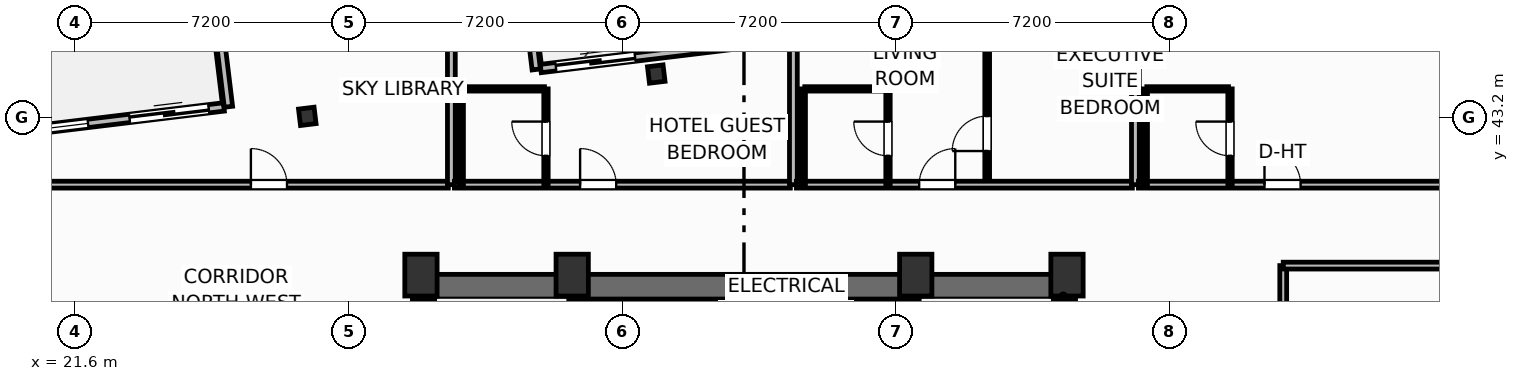
"""IFC4 building model, lengths in metres.
Left out: names, types, materials, properties, quantities, classifications, styles, units other than length and angle.
Written with IfcOpenShell. Run it as: python <this file> out.ifc"""

import sys

from ifc_helpers import new_model, si_unit, direction, frame, frame_2d, origin, origin_2d, place, context, subcontext, project, spatial, rectangle, i_section, extrude, element, fill, save


model = new_model("IFC4")
c1 = context("Model", 3, precision=1e-05, world=origin(), true_north=direction((0.0, 1.0)))
c2 = subcontext(c1, "Body", "Model", "MODEL_VIEW")
j1 = project(units=[si_unit("LENGTHUNIT", "METRE"), si_unit("PLANEANGLEUNIT", "RADIAN")], contexts=[c1])
p1 = place(None, origin())
s1 = spatial("IfcSite", under=j1, at=p1, CompositionType="ELEMENT")
p2 = place(p1, origin())
s2 = spatial("IfcBuilding", under=s1, at=p2, CompositionType="ELEMENT")
p3 = place(p2, frame((0.0, 0.0, 178.3)))
s3 = spatial("IfcBuildingStorey", under=s2, at=p3, CompositionType="ELEMENT", Elevation=178.3)
for number, where, z_axis, x_axis in (
    (1, (30.7, 39.05, 0.0), (0.0, 0.0, 1.0), (1.0, 0.0, 0.0)),
    (2, (34.68, 39.05, 0.0), (0.0, 0.0, 1.0), (1.0, 0.0, 0.0)),
    (3, (43.72, 39.05, 0.0), (0.0, 0.0, 1.0), (1.0, 0.0, 0.0)),
    (4, (47.7, 39.05, 0.0), (0.0, 0.0, 1.0), (1.0, 0.0, 0.0)),
):
    element("IfcColumn", number, at=place(p3, frame(where, z_axis=z_axis, x_axis=x_axis)), inside=s3, PredefinedType="COLUMN", context=c2, shape_type="SweptSolid", body=[
        extrude(rectangle(XDim=0.85, YDim=1.1, at=origin_2d()), origin(), (0.0, 0.0, 1.0), 3.7),
    ])
p4 = place(p3, frame((30.48, 38.745, 0.0), z_axis=(0.0, 0.0, 1.0), x_axis=(1.0, 0.0, 0.0)))
e5 = element("IfcWall", 5, at=p4, inside=s3, PredefinedType="SHEAR", context=c2, shape_type="SweptSolid", body=[
    extrude(rectangle(XDim=17.44, YDim=0.65, at=frame_2d((8.72, 0.0))), origin(), (0.0, 0.0, 1.0), 3.45),
])
for number, where, z_axis, x_axis in (
    (6, (30.805, 29.2, 0.0), (0.0, 0.0, 1.0), (0.0, 1.0, 0.0)),
    (7, (47.595, 29.2, 0.0), (0.0, 0.0, 1.0), (0.0, 1.0, 0.0)),
):
    element("IfcWall", number, at=place(p3, frame(where, z_axis=z_axis, x_axis=x_axis)), inside=s3, PredefinedType="SHEAR", context=c2, shape_type="SweptSolid", body=[
        extrude(rectangle(XDim=9.22, YDim=0.65, at=frame_2d((4.61, 0.0))), origin(), (0.0, 0.0, 1.0), 3.45),
    ])
p5 = place(p3, frame((34.64, 29.2, 0.0), z_axis=(0.0, 0.0, 1.0), x_axis=(0.0, 1.0, 0.0)))
e8 = element("IfcWall", 8, at=p5, inside=s3, PredefinedType="SHEAR", context=c2, shape_type="SweptSolid", body=[
    extrude(rectangle(XDim=9.22, YDim=0.25, at=frame_2d((4.61, 0.0))), origin(), (0.0, 0.0, 1.0), 3.45),
])
p6 = place(p5, frame((0.65, 0.0, 0.0)))
e9 = element("IfcOpeningElement", 9, at=p6, cuts=e8, PredefinedType="OPENING", context=c2, shape_type="SweptSolid", body=[
    extrude(rectangle(XDim=1.05, YDim=2.15, at=frame_2d((0.525, 1.075))), frame((0.0, 0.135, 0.0), z_axis=(0.0, -1.0, 0.0), x_axis=(1.0, 0.0, 0.0)), (0.0, 0.0, 1.0), 0.27),
])
p7 = place(p3, frame((43.76, 29.2, 0.0), z_axis=(0.0, 0.0, 1.0), x_axis=(0.0, 1.0, 0.0)))
e10 = element("IfcWall", 10, at=p7, inside=s3, PredefinedType="SHEAR", context=c2, shape_type="SweptSolid", body=[
    extrude(rectangle(XDim=9.22, YDim=0.25, at=frame_2d((4.61, 0.0))), origin(), (0.0, 0.0, 1.0), 3.45),
])
p8 = place(p7, frame((0.65, 0.0, 0.0)))
e11 = element("IfcOpeningElement", 11, at=p8, cuts=e10, PredefinedType="OPENING", context=c2, shape_type="SweptSolid", body=[
    extrude(rectangle(XDim=1.05, YDim=2.15, at=frame_2d((0.525, 1.075))), frame((0.0, 0.135, 0.0), z_axis=(0.0, -1.0, 0.0), x_axis=(1.0, 0.0, 0.0)), (0.0, 0.0, 1.0), 0.27),
])
for number, where, z_axis, x_axis in (
    (12, (36.892, 44.341, 0.0), (0.0, 0.0, 1.0), (0.993, 0.12, 0.0)),
    (13, (27.709, 43.227, 0.0), (0.0, 0.0, 1.0), (0.993, 0.12, 0.0)),
):
    element("IfcColumn", number, at=place(p3, frame(where, z_axis=z_axis, x_axis=x_axis)), inside=s3, PredefinedType="COLUMN", context=c2, shape_type="SweptSolid", body=[
        extrude(i_section(OverallWidth=0.412, OverallDepth=0.435, WebThickness=0.036, FlangeThickness=0.057, FilletRadius=0.025, at=origin_2d()), origin(), (0.0, 0.0, 1.0), 3.7),
    ])
p9 = place(p3, frame((19.557, 42.753, 0.0), z_axis=(0.0, 0.0, 1.0), x_axis=(0.992729951822, 0.120362962556, 0.0)))
e14 = element("IfcWall", 14, at=p9, inside=s3, PredefinedType="SOLIDWALL", context=c2, shape_type="SweptSolid", body=[
    extrude(rectangle(XDim=6.0, YDim=0.22, at=frame_2d((3.0, 0.0))), origin(), (0.0, 0.0, 1.0), 2.73),
])
p10 = place(p9, frame((3.5, 0.0, 0.0)))
e15 = element("IfcOpeningElement", 15, at=p10, cuts=e14, PredefinedType="OPENING", context=c2, shape_type="SweptSolid", body=[
    extrude(rectangle(XDim=2.1, YDim=2.3, at=frame_2d((1.05, 1.15))), frame((0.0, 0.12, 0.0), z_axis=(0.0, -1.0, 0.0), x_axis=(1.0, 0.0, 0.0)), (0.0, 0.0, 1.0), 0.24),
])
p11 = place(p9, frame((0.55, 0.0, 0.75)))
e16 = element("IfcOpeningElement", 16, at=p11, cuts=e14, PredefinedType="OPENING", context=c2, shape_type="SweptSolid", body=[
    extrude(rectangle(XDim=1.85, YDim=1.75, at=frame_2d((0.925, 0.875))), frame((0.0, 0.12, 0.0), z_axis=(0.0, -1.0, 0.0), x_axis=(1.0, 0.0, 0.0)), (0.0, 0.0, 1.0), 0.24),
])
p12 = place(p3, frame((33.852, 44.486, 0.0), z_axis=(0.0, 0.0, 1.0), x_axis=(0.992729951822, 0.120362962556, 0.0)))
e17 = element("IfcWall", 17, at=p12, inside=s3, PredefinedType="SOLIDWALL", context=c2, shape_type="SweptSolid", body=[
    extrude(rectangle(XDim=6.0, YDim=0.22, at=frame_2d((3.0, 0.0))), origin(), (0.0, 0.0, 1.0), 2.73),
])
p13 = place(p12, frame((0.4, 0.0, 0.0)))
e18 = element("IfcOpeningElement", 18, at=p13, cuts=e17, PredefinedType="OPENING", context=c2, shape_type="SweptSolid", body=[
    extrude(rectangle(XDim=2.1, YDim=2.3, at=frame_2d((1.05, 1.15))), frame((0.0, 0.12, 0.0), z_axis=(0.0, -1.0, 0.0), x_axis=(1.0, 0.0, 0.0)), (0.0, 0.0, 1.0), 0.24),
])
p14 = place(p3, frame((33.734, 44.461, 0.0), z_axis=(0.0, 0.0, 1.0), x_axis=(-0.120327895535, 0.992734202874, 0.0)))
e19 = element("IfcWall", 19, at=p14, inside=s3, PredefinedType="SOLIDWALL", context=c2, shape_type="SweptSolid", body=[
    extrude(rectangle(XDim=2.1, YDim=0.22, at=frame_2d((1.05, 0.0))), origin(), (0.0, 0.0, 1.0), 2.73),
])
p15 = place(p3, frame((25.396, 45.44, 0.0), z_axis=(0.0, 0.0, 1.0), x_axis=(0.120275992932, -0.992740492538, 0.0)))
e20 = element("IfcWall", 20, at=p15, inside=s3, PredefinedType="SOLIDWALL", context=c2, shape_type="SweptSolid", body=[
    extrude(rectangle(XDim=1.975, YDim=0.22, at=frame_2d((0.988, 0.0))), origin(), (0.0, 0.0, 1.0), 2.73),
])
p16 = place(p3, frame((3.393, 41.43, 0.0), z_axis=(0.0, 0.0, 1.0), x_axis=(1.0, 0.0, 0.0)))
e21 = element("IfcWall", 21, at=p16, inside=s3, PredefinedType="PARTITIONING", context=c2, shape_type="SweptSolid", body=[
    extrude(rectangle(XDim=28.027, YDim=0.18, at=frame_2d((14.013, 0.0))), origin(), (0.0, 0.0, 1.0), 2.662),
])
p17 = place(p16, frame((22.832, 0.0, 0.0)))
e22 = element("IfcOpeningElement", 22, at=p17, cuts=e21, PredefinedType="OPENING", context=c2, shape_type="SweptSolid", body=[
    extrude(rectangle(XDim=0.95, YDim=2.05, at=frame_2d((0.475, 1.025))), frame((0.0, 0.1, 0.0), z_axis=(0.0, -1.0, 0.0), x_axis=(1.0, 0.0, 0.0)), (0.0, 0.0, 1.0), 0.2),
])
p18 = place(p3, frame((31.5, 41.43, 0.0), z_axis=(0.0, 0.0, 1.0), x_axis=(0.0, 1.0, 0.0)))
e23 = element("IfcWall", 23, at=p18, inside=s3, PredefinedType="PARTITIONING", context=c2, shape_type="SweptSolid", body=[
    extrude(rectangle(XDim=4.856, YDim=0.205, at=frame_2d((2.428, 0.0))), origin(), (0.0, 0.0, 1.0), 3.45),
])
p19 = place(p3, frame((31.58, 41.43, 0.0), z_axis=(0.0, 0.0, 1.0), x_axis=(1.0, 0.0, 0.0)))
e24 = element("IfcWall", 24, at=p19, inside=s3, PredefinedType="PARTITIONING", context=c2, shape_type="SweptSolid", body=[
    extrude(rectangle(XDim=8.84, YDim=0.18, at=frame_2d((4.42, 0.0))), origin(), (0.0, 0.0, 1.0), 3.45),
])
p20 = place(p19, frame((3.308, 0.0, 0.0)))
e25 = element("IfcOpeningElement", 25, at=p20, cuts=e24, PredefinedType="OPENING", context=c2, shape_type="SweptSolid", body=[
    extrude(rectangle(XDim=0.95, YDim=2.15, at=frame_2d((0.475, 1.075))), frame((0.0, 0.1, 0.0), z_axis=(0.0, -1.0, 0.0), x_axis=(1.0, 0.0, 0.0)), (0.0, 0.0, 1.0), 0.2),
])
p21 = place(p3, frame((31.8, 43.95, 0.0), z_axis=(0.0, 0.0, 1.0), x_axis=(1.0, 0.0, 0.0)))
e26 = element("IfcWall", 26, at=p21, inside=s3, PredefinedType="PARTITIONING", context=c2, shape_type="SweptSolid", body=[
    extrude(rectangle(XDim=2.15, YDim=0.115, at=frame_2d((1.075, 0.0))), origin(), (0.0, 0.0, 1.0), 2.824),
])
p22 = place(p3, frame((33.99, 41.43, 0.0), z_axis=(0.0, 0.0, 1.0), x_axis=(0.0, 1.0, 0.0)))
e27 = element("IfcWall", 27, at=p22, inside=s3, PredefinedType="PARTITIONING", context=c2, shape_type="SweptSolid", body=[
    extrude(rectangle(XDim=2.52, YDim=0.115, at=frame_2d((1.26, 0.0))), origin(), (0.0, 0.0, 1.0), 3.45),
])
p23 = place(p22, frame((0.76, 0.0, 0.0)))
e28 = element("IfcOpeningElement", 28, at=p23, cuts=e27, PredefinedType="OPENING", context=c2, shape_type="SweptSolid", body=[
    extrude(rectangle(XDim=0.9, YDim=2.05, at=frame_2d((0.45, 1.025))), frame((0.0, 0.067, 0.0), z_axis=(0.0, -1.0, 0.0), x_axis=(1.0, 0.0, 0.0)), (0.0, 0.0, 1.0), 0.135),
])
p24 = place(p3, frame((31.76, 41.43, 0.0), z_axis=(0.0, 0.0, 1.0), x_axis=(0.0, 1.0, 0.0)))
e29 = element("IfcWall", 29, at=p24, inside=s3, PredefinedType="PARTITIONING", context=c2, shape_type="SweptSolid", body=[
    extrude(rectangle(XDim=2.52, YDim=0.115, at=frame_2d((1.26, 0.0))), origin(), (0.0, 0.0, 1.0), 3.45),
])
p25 = place(p3, frame((40.5, 41.43, 0.0), z_axis=(0.0, 0.0, 1.0), x_axis=(0.0, 1.0, 0.0)))
e30 = element("IfcWall", 30, at=p25, inside=s3, PredefinedType="PARTITIONING", context=c2, shape_type="SweptSolid", body=[
    extrude(rectangle(XDim=5.947, YDim=0.205, at=frame_2d((2.974, 0.0))), origin(), (0.0, 0.0, 1.0), 3.45),
])
p26 = place(p3, frame((45.6, 41.43, 0.0), z_axis=(0.0, 0.0, 1.0), x_axis=(0.0, 1.0, 0.0)))
e31 = element("IfcWall", 31, at=p26, inside=s3, PredefinedType="PARTITIONING", context=c2, shape_type="SweptSolid", body=[
    extrude(rectangle(XDim=6.565, YDim=0.125, at=frame_2d((3.283, 0.0))), origin(), (0.0, 0.0, 1.0), 3.45),
])
p27 = place(p26, frame((0.885, 0.0, 0.0)))
e32 = element("IfcOpeningElement", 32, at=p27, cuts=e31, PredefinedType="OPENING", context=c2, shape_type="SweptSolid", body=[
    extrude(rectangle(XDim=0.92, YDim=2.05, at=frame_2d((0.46, 1.025))), frame((0.0, 0.073, 0.0), z_axis=(0.0, -1.0, 0.0), x_axis=(1.0, 0.0, 0.0)), (0.0, 0.0, 1.0), 0.145),
])
p28 = place(p3, frame((40.58, 41.43, 0.0), z_axis=(0.0, 0.0, 1.0), x_axis=(1.0, 0.0, 0.0)))
e33 = element("IfcWall", 33, at=p28, inside=s3, PredefinedType="PARTITIONING", context=c2, shape_type="SweptSolid", body=[
    extrude(rectangle(XDim=8.84, YDim=0.18, at=frame_2d((4.42, 0.0))), origin(), (0.0, 0.0, 1.0), 3.45),
])
p29 = place(p28, frame((3.23, 0.0, 0.0)))
e34 = element("IfcOpeningElement", 34, at=p29, cuts=e33, PredefinedType="OPENING", context=c2, shape_type="SweptSolid", body=[
    extrude(rectangle(XDim=0.95, YDim=2.15, at=frame_2d((0.475, 1.075))), frame((0.0, 0.1, 0.0), z_axis=(0.0, -1.0, 0.0), x_axis=(1.0, 0.0, 0.0)), (0.0, 0.0, 1.0), 0.2),
])
p30 = place(p3, frame((40.8, 43.95, 0.0), z_axis=(0.0, 0.0, 1.0), x_axis=(1.0, 0.0, 0.0)))
e35 = element("IfcWall", 35, at=p30, inside=s3, PredefinedType="PARTITIONING", context=c2, shape_type="SweptSolid", body=[
    extrude(rectangle(XDim=2.15, YDim=0.115, at=frame_2d((1.075, 0.0))), origin(), (0.0, 0.0, 1.0), 3.45),
])
p31 = place(p3, frame((42.99, 41.43, 0.0), z_axis=(0.0, 0.0, 1.0), x_axis=(0.0, 1.0, 0.0)))
e36 = element("IfcWall", 36, at=p31, inside=s3, PredefinedType="PARTITIONING", context=c2, shape_type="SweptSolid", body=[
    extrude(rectangle(XDim=2.52, YDim=0.115, at=frame_2d((1.26, 0.0))), origin(), (0.0, 0.0, 1.0), 3.45),
])
p32 = place(p31, frame((0.76, 0.0, 0.0)))
e37 = element("IfcOpeningElement", 37, at=p32, cuts=e36, PredefinedType="OPENING", context=c2, shape_type="SweptSolid", body=[
    extrude(rectangle(XDim=0.9, YDim=2.05, at=frame_2d((0.45, 1.025))), frame((0.0, 0.067, 0.0), z_axis=(0.0, -1.0, 0.0), x_axis=(1.0, 0.0, 0.0)), (0.0, 0.0, 1.0), 0.135),
])
p33 = place(p3, frame((40.76, 41.43, 0.0), z_axis=(0.0, 0.0, 1.0), x_axis=(0.0, 1.0, 0.0)))
e38 = element("IfcWall", 38, at=p33, inside=s3, PredefinedType="PARTITIONING", context=c2, shape_type="SweptSolid", body=[
    extrude(rectangle(XDim=2.52, YDim=0.115, at=frame_2d((1.26, 0.0))), origin(), (0.0, 0.0, 1.0), 3.45),
])
p34 = place(p3, frame((49.5, 41.43, 0.0), z_axis=(0.0, 0.0, 1.0), x_axis=(0.0, 1.0, 0.0)))
e39 = element("IfcWall", 39, at=p34, inside=s3, PredefinedType="PARTITIONING", context=c2, shape_type="SweptSolid", body=[
    extrude(rectangle(XDim=4.923, YDim=0.205, at=frame_2d((2.461, 0.0))), origin(), (0.0, 0.0, 1.0), 3.45),
])
p35 = place(p3, frame((49.58, 41.43, 0.0), z_axis=(0.0, 0.0, 1.0), x_axis=(1.0, 0.0, 0.0)))
e40 = element("IfcWall", 40, at=p35, inside=s3, PredefinedType="PARTITIONING", context=c2, shape_type="SweptSolid", body=[
    extrude(rectangle(XDim=23.042, YDim=0.18, at=frame_2d((11.521, 0.0))), origin(), (0.0, 0.0, 1.0), 3.45),
])
p36 = place(p35, frame((3.317, 0.0, 0.0)))
e41 = element("IfcOpeningElement", 41, at=p36, cuts=e40, PredefinedType="OPENING", context=c2, shape_type="SweptSolid", body=[
    extrude(rectangle(XDim=0.95, YDim=2.15, at=frame_2d((0.475, 1.075))), frame((0.0, 0.1, 0.0), z_axis=(0.0, -1.0, 0.0), x_axis=(1.0, 0.0, 0.0)), (0.0, 0.0, 1.0), 0.2),
])
p37 = place(p3, frame((49.8, 43.95, 0.0), z_axis=(0.0, 0.0, 1.0), x_axis=(1.0, 0.0, 0.0)))
e42 = element("IfcWall", 42, at=p37, inside=s3, PredefinedType="PARTITIONING", context=c2, shape_type="SweptSolid", body=[
    extrude(rectangle(XDim=2.15, YDim=0.115, at=frame_2d((1.075, 0.0))), origin(), (0.0, 0.0, 1.0), 3.45),
])
p38 = place(p3, frame((51.99, 41.43, 0.0), z_axis=(0.0, 0.0, 1.0), x_axis=(0.0, 1.0, 0.0)))
e43 = element("IfcWall", 43, at=p38, inside=s3, PredefinedType="PARTITIONING", context=c2, shape_type="SweptSolid", body=[
    extrude(rectangle(XDim=2.52, YDim=0.115, at=frame_2d((1.26, 0.0))), origin(), (0.0, 0.0, 1.0), 3.45),
])
p39 = place(p38, frame((0.76, 0.0, 0.0)))
e44 = element("IfcOpeningElement", 44, at=p39, cuts=e43, PredefinedType="OPENING", context=c2, shape_type="SweptSolid", body=[
    extrude(rectangle(XDim=0.9, YDim=2.05, at=frame_2d((0.45, 1.025))), frame((0.0, 0.067, 0.0), z_axis=(0.0, -1.0, 0.0), x_axis=(1.0, 0.0, 0.0)), (0.0, 0.0, 1.0), 0.135),
])
p40 = place(p3, frame((49.76, 41.43, 0.0), z_axis=(0.0, 0.0, 1.0), x_axis=(0.0, 1.0, 0.0)))
e45 = element("IfcWall", 45, at=p40, inside=s3, PredefinedType="PARTITIONING", context=c2, shape_type="SweptSolid", body=[
    extrude(rectangle(XDim=2.52, YDim=0.115, at=frame_2d((1.26, 0.0))), origin(), (0.0, 0.0, 1.0), 3.45),
])
p41 = place(p3, frame((53.39, 19.28, 0.0), z_axis=(0.0, 0.0, 1.0), x_axis=(0.0, 1.0, 0.0)))
e46 = element("IfcWall", 46, at=p41, inside=s3, PredefinedType="PARTITIONING", context=c2, shape_type="SweptSolid", body=[
    extrude(rectangle(XDim=20.02, YDim=0.18, at=frame_2d((10.01, 0.0))), origin(), (0.0, 0.0, 1.0), 3.45),
])
p42 = place(p41, frame((8.07, 0.0, 0.0)))
e47 = element("IfcOpeningElement", 47, at=p42, cuts=e46, PredefinedType="OPENING", context=c2, shape_type="SweptSolid", body=[
    extrude(rectangle(XDim=0.92, YDim=2.05, at=frame_2d((0.46, 1.025))), frame((0.0, 0.1, 0.0), z_axis=(0.0, -1.0, 0.0), x_axis=(1.0, 0.0, 0.0)), (0.0, 0.0, 1.0), 0.2),
])
p43 = place(p3, frame((53.39, 39.3, 0.0), z_axis=(0.0, 0.0, 1.0), x_axis=(1.0, 0.0, 0.0)))
e48 = element("IfcWall", 48, at=p43, inside=s3, PredefinedType="PARTITIONING", context=c2, shape_type="SweptSolid", body=[
    extrude(rectangle(XDim=19.49, YDim=0.18, at=frame_2d((9.745, 0.0))), origin(), (0.0, 0.0, 1.0), 3.45),
])
p44 = place(p10, origin())
e49 = element("IfcDoor", 49, at=p44, inside=s3, OperationType="SLIDING_TO_LEFT", PredefinedType="DOOR", context=c2, shape_type="SweptSolid", body=[
    extrude(rectangle(XDim=2.1, YDim=2.3, at=frame_2d((1.05, 1.15))), frame((0.0, 0.025, 0.0), z_axis=(0.0, -1.0, 0.0), x_axis=(1.0, 0.0, 0.0)), (0.0, 0.0, 1.0), 0.05),
])
fill(e15, e49)
p45 = place(p11, origin())
e50 = element("IfcWindow", 50, at=p45, inside=s3, PartitioningType="SINGLE_PANEL", PredefinedType="WINDOW", context=c2, shape_type="SweptSolid", body=[
    extrude(rectangle(XDim=1.85, YDim=1.75, at=frame_2d((0.925, 0.875))), frame((0.0, 0.03, 0.0), z_axis=(0.0, -1.0, 0.0), x_axis=(1.0, 0.0, 0.0)), (0.0, 0.0, 1.0), 0.06),
])
fill(e16, e50)
p46 = place(p13, origin())
e51 = element("IfcDoor", 51, at=p46, inside=s3, OperationType="SLIDING_TO_LEFT", PredefinedType="DOOR", context=c2, shape_type="SweptSolid", body=[
    extrude(rectangle(XDim=2.1, YDim=2.3, at=frame_2d((1.05, 1.15))), frame((0.0, 0.025, 0.0), z_axis=(0.0, -1.0, 0.0), x_axis=(1.0, 0.0, 0.0)), (0.0, 0.0, 1.0), 0.05),
])
fill(e18, e51)
p47 = place(p17, origin())
e52 = element("IfcDoor", 52, at=p47, inside=s3, OperationType="SINGLE_SWING_LEFT", PredefinedType="DOOR", context=c2, shape_type="SweptSolid", body=[
    extrude(rectangle(XDim=0.95, YDim=2.05, at=frame_2d((0.475, 1.025))), frame((0.0, 0.025, 0.0), z_axis=(0.0, -1.0, 0.0), x_axis=(1.0, 0.0, 0.0)), (0.0, 0.0, 1.0), 0.05),
])
fill(e22, e52)
p48 = place(p20, origin())
e53 = element("IfcDoor", 53, at=p48, inside=s3, OperationType="SINGLE_SWING_LEFT", PredefinedType="DOOR", context=c2, shape_type="SweptSolid", body=[
    extrude(rectangle(XDim=0.95, YDim=2.15, at=frame_2d((0.475, 1.075))), frame((0.0, 0.025, 0.0), z_axis=(0.0, -1.0, 0.0), x_axis=(1.0, 0.0, 0.0)), (0.0, 0.0, 1.0), 0.05),
])
fill(e25, e53)
p49 = place(p23, origin())
e54 = element("IfcDoor", 54, at=p49, inside=s3, OperationType="SINGLE_SWING_RIGHT", PredefinedType="DOOR", context=c2, shape_type="SweptSolid", body=[
    extrude(rectangle(XDim=0.9, YDim=2.05, at=frame_2d((0.45, 1.025))), frame((0.0, 0.025, 0.0), z_axis=(0.0, -1.0, 0.0), x_axis=(1.0, 0.0, 0.0)), (0.0, 0.0, 1.0), 0.05),
])
fill(e28, e54)
p50 = place(p27, origin())
e55 = element("IfcDoor", 55, at=p50, inside=s3, OperationType="SINGLE_SWING_LEFT", PredefinedType="DOOR", context=c2, shape_type="SweptSolid", body=[
    extrude(rectangle(XDim=0.92, YDim=2.05, at=frame_2d((0.46, 1.025))), frame((0.0, 0.025, 0.0), z_axis=(0.0, -1.0, 0.0), x_axis=(1.0, 0.0, 0.0)), (0.0, 0.0, 1.0), 0.05),
])
fill(e32, e55)
p51 = place(p29, origin())
e56 = element("IfcDoor", 56, at=p51, inside=s3, OperationType="SINGLE_SWING_RIGHT", PredefinedType="DOOR", context=c2, shape_type="SweptSolid", body=[
    extrude(rectangle(XDim=0.95, YDim=2.15, at=frame_2d((0.475, 1.075))), frame((0.0, 0.025, 0.0), z_axis=(0.0, -1.0, 0.0), x_axis=(1.0, 0.0, 0.0)), (0.0, 0.0, 1.0), 0.05),
])
fill(e34, e56)
p52 = place(p32, origin())
e57 = element("IfcDoor", 57, at=p52, inside=s3, OperationType="SINGLE_SWING_RIGHT", PredefinedType="DOOR", context=c2, shape_type="SweptSolid", body=[
    extrude(rectangle(XDim=0.9, YDim=2.05, at=frame_2d((0.45, 1.025))), frame((0.0, 0.025, 0.0), z_axis=(0.0, -1.0, 0.0), x_axis=(1.0, 0.0, 0.0)), (0.0, 0.0, 1.0), 0.05),
])
fill(e37, e57)
p53 = place(p36, origin())
e58 = element("IfcDoor", 58, at=p53, inside=s3, OperationType="SINGLE_SWING_LEFT", PredefinedType="DOOR", context=c2, shape_type="SweptSolid", body=[
    extrude(rectangle(XDim=0.95, YDim=2.15, at=frame_2d((0.475, 1.075))), frame((0.0, 0.025, 0.0), z_axis=(0.0, -1.0, 0.0), x_axis=(1.0, 0.0, 0.0)), (0.0, 0.0, 1.0), 0.05),
])
fill(e41, e58)
p54 = place(p39, origin())
e59 = element("IfcDoor", 59, at=p54, inside=s3, OperationType="SINGLE_SWING_RIGHT", PredefinedType="DOOR", context=c2, shape_type="SweptSolid", body=[
    extrude(rectangle(XDim=0.9, YDim=2.05, at=frame_2d((0.45, 1.025))), frame((0.0, 0.025, 0.0), z_axis=(0.0, -1.0, 0.0), x_axis=(1.0, 0.0, 0.0)), (0.0, 0.0, 1.0), 0.05),
])
fill(e44, e59)
save(model, sys.argv[1])
